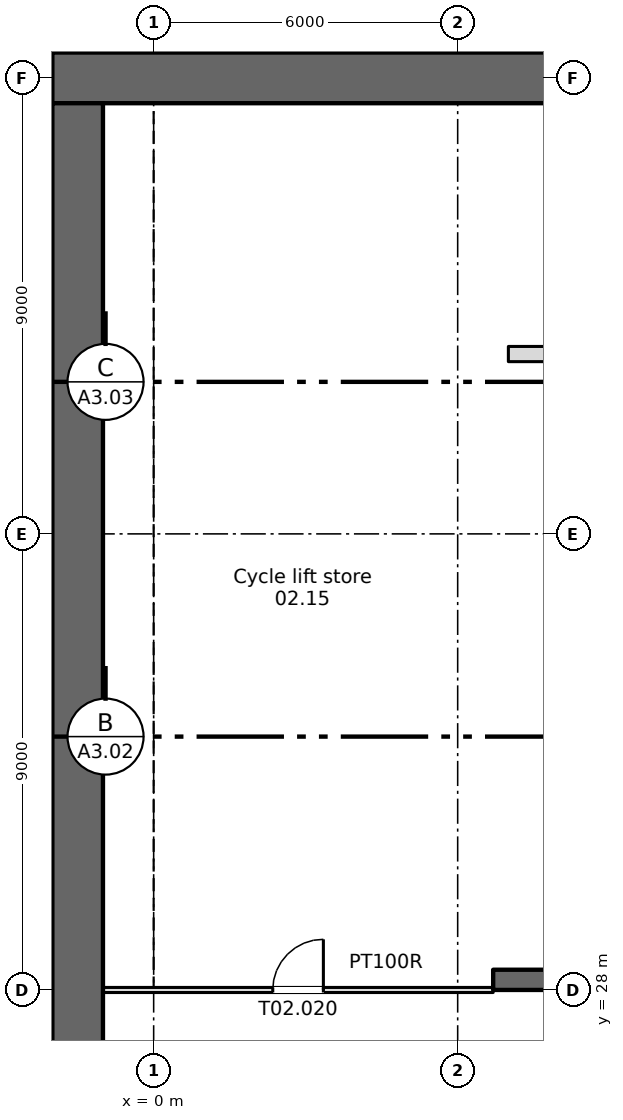
"""IFC4 building model, lengths in metres.
Left out: names, types, materials, properties, quantities, classifications, styles, units other than length and angle.
Written with IfcOpenShell. Run it as: python <this file> out.ifc"""

import sys

from ifc_helpers import new_model, si_unit, direction, frame, frame_2d, origin, place, context, subcontext, project, spatial, rectangle, extrude, element, fill, save


model = new_model("IFC4")
c1 = context("Model", 3, precision=1e-05, world=origin(), true_north=direction((0.0, 1.0)))
c2 = subcontext(c1, "Body", "Model", "MODEL_VIEW")
j1 = project(units=[si_unit("LENGTHUNIT", "METRE"), si_unit("PLANEANGLEUNIT", "RADIAN")], contexts=[c1])
p1 = place(None, origin())
s1 = spatial("IfcSite", under=j1, at=p1, CompositionType="ELEMENT")
p2 = place(p1, origin())
s2 = spatial("IfcBuilding", under=s1, at=p2, CompositionType="ELEMENT")
p3 = place(p2, frame((0.0, 0.0, -6.0)))
s3 = spatial("IfcBuildingStorey", under=s2, at=p3, CompositionType="ELEMENT", Elevation=-6.0)
p4 = place(p3, frame((-2.0, 46.0, 0.0), z_axis=(0.0, 0.0, 1.0), x_axis=(1.0, 0.0, 0.0)))
e1 = element("IfcWall", 1, at=p4, inside=s3, PredefinedType="SOLIDWALL", context=c2, shape_type="SweptSolid", body=[
    extrude(rectangle(XDim=82.0, YDim=1.0, at=frame_2d((41.0, 0.0))), origin(), (0.0, 0.0, 1.0), 5.55),
])
p5 = place(p3, frame((-1.5, -0.5, 0.0), z_axis=(0.0, 0.0, 1.0), x_axis=(0.0, 1.0, 0.0)))
e2 = element("IfcWall", 2, at=p5, inside=s3, PredefinedType="SOLIDWALL", context=c2, shape_type="SweptSolid", body=[
    extrude(rectangle(XDim=46.0, YDim=1.0, at=frame_2d((23.0, 0.0))), origin(), (0.0, 0.0, 1.0), 5.55),
])
p6 = place(p3, frame((6.7, 28.2, 0.0), z_axis=(0.0, 0.0, 1.0), x_axis=(1.0, 0.0, 0.0)))
e3 = element("IfcWall", 3, at=p6, inside=s3, PredefinedType="SHEAR", context=c2, shape_type="SweptSolid", body=[
    extrude(rectangle(XDim=66.3, YDim=0.4, at=frame_2d((33.15, 0.0))), origin(), (0.0, 0.0, 1.0), 5.55),
])
p7 = place(p6, frame((13.85, 0.0, 0.0)))
e4 = element("IfcOpeningElement", 4, at=p7, cuts=e3, PredefinedType="OPENING", context=c2, shape_type="SweptSolid", body=[
    extrude(rectangle(XDim=0.9, YDim=2.1, at=frame_2d((0.45, 1.05))), frame((0.0, 0.21, 0.0), z_axis=(0.0, -1.0, 0.0), x_axis=(1.0, 0.0, 0.0)), (0.0, 0.0, 1.0), 0.42),
])
p8 = place(p6, frame((49.85, 0.0, 0.0)))
e5 = element("IfcOpeningElement", 5, at=p8, cuts=e3, PredefinedType="OPENING", context=c2, shape_type="SweptSolid", body=[
    extrude(rectangle(XDim=0.9, YDim=2.1, at=frame_2d((0.45, 1.05))), frame((0.0, 0.21, 0.0), z_axis=(0.0, -1.0, 0.0), x_axis=(1.0, 0.0, 0.0)), (0.0, 0.0, 1.0), 0.42),
])
p9 = place(p6, frame((1.35, 0.0, 0.0)))
e6 = element("IfcOpeningElement", 6, at=p9, cuts=e3, PredefinedType="OPENING", context=c2, shape_type="SweptSolid", body=[
    extrude(rectangle(XDim=0.9, YDim=2.1, at=frame_2d((0.45, 1.05))), frame((0.0, 0.21, 0.0), z_axis=(0.0, -1.0, 0.0), x_axis=(1.0, 0.0, 0.0)), (0.0, 0.0, 1.0), 0.42),
])
p10 = place(p6, frame((59.363, 0.0, 0.0)))
e7 = element("IfcOpeningElement", 7, at=p10, cuts=e3, PredefinedType="OPENING", context=c2, shape_type="SweptSolid", body=[
    extrude(rectangle(XDim=0.9, YDim=2.1, at=frame_2d((0.45, 1.05))), frame((0.0, 0.21, 0.0), z_axis=(0.0, -1.0, 0.0), x_axis=(1.0, 0.0, 0.0)), (0.0, 0.0, 1.0), 0.42),
])
p11 = place(p6, frame((63.538, 0.0, 0.0)))
e8 = element("IfcOpeningElement", 8, at=p11, cuts=e3, PredefinedType="OPENING", context=c2, shape_type="SweptSolid", body=[
    extrude(rectangle(XDim=0.9, YDim=2.1, at=frame_2d((0.45, 1.05))), frame((0.0, 0.21, 0.0), z_axis=(0.0, -1.0, 0.0), x_axis=(1.0, 0.0, 0.0)), (0.0, 0.0, 1.0), 0.42),
])
p12 = place(p6, frame((4.7, 0.0, 0.0)))
e9 = element("IfcOpeningElement", 9, at=p12, cuts=e3, PredefinedType="OPENING", context=c2, shape_type="SweptSolid", body=[
    extrude(rectangle(XDim=1.2, YDim=2.1, at=frame_2d((0.6, 1.05))), frame((0.0, 0.21, 0.0), z_axis=(0.0, -1.0, 0.0), x_axis=(1.0, 0.0, 0.0)), (0.0, 0.0, 1.0), 0.42),
])
p13 = place(p6, frame((31.7, 0.0, 0.0)))
e10 = element("IfcOpeningElement", 10, at=p13, cuts=e3, PredefinedType="OPENING", context=c2, shape_type="SweptSolid", body=[
    extrude(rectangle(XDim=1.2, YDim=2.1, at=frame_2d((0.6, 1.05))), frame((0.0, 0.21, 0.0), z_axis=(0.0, -1.0, 0.0), x_axis=(1.0, 0.0, 0.0)), (0.0, 0.0, 1.0), 0.42),
])
p14 = place(p6, frame((55.2, 0.0, 0.0)))
e11 = element("IfcOpeningElement", 11, at=p14, cuts=e3, PredefinedType="OPENING", context=c2, shape_type="SweptSolid", body=[
    extrude(rectangle(XDim=1.2, YDim=2.1, at=frame_2d((0.6, 1.05))), frame((0.0, 0.21, 0.0), z_axis=(0.0, -1.0, 0.0), x_axis=(1.0, 0.0, 0.0)), (0.0, 0.0, 1.0), 0.42),
])
p15 = place(p6, frame((21.7, 0.0, 0.0)))
e12 = element("IfcOpeningElement", 12, at=p15, cuts=e3, PredefinedType="OPENING", context=c2, shape_type="SweptSolid", body=[
    extrude(rectangle(XDim=1.2, YDim=2.1, at=frame_2d((0.6, 1.05))), frame((0.0, 0.21, 0.0), z_axis=(0.0, -1.0, 0.0), x_axis=(1.0, 0.0, 0.0)), (0.0, 0.0, 1.0), 0.42),
])
p16 = place(p6, frame((41.7, 0.0, 0.0)))
e13 = element("IfcOpeningElement", 13, at=p16, cuts=e3, PredefinedType="OPENING", context=c2, shape_type="SweptSolid", body=[
    extrude(rectangle(XDim=1.2, YDim=2.1, at=frame_2d((0.6, 1.05))), frame((0.0, 0.21, 0.0), z_axis=(0.0, -1.0, 0.0), x_axis=(1.0, 0.0, 0.0)), (0.0, 0.0, 1.0), 0.42),
])
p17 = place(p6, frame((24.85, 0.0, 0.0)))
e14 = element("IfcOpeningElement", 14, at=p17, cuts=e3, PredefinedType="OPENING", context=c2, shape_type="SweptSolid", body=[
    extrude(rectangle(XDim=2.4, YDim=2.1, at=frame_2d((1.2, 1.05))), frame((0.0, 0.21, 0.0), z_axis=(0.0, -1.0, 0.0), x_axis=(1.0, 0.0, 0.0)), (0.0, 0.0, 1.0), 0.42),
])
p18 = place(p6, frame((37.35, 0.0, 0.0)))
e15 = element("IfcOpeningElement", 15, at=p18, cuts=e3, PredefinedType="OPENING", context=c2, shape_type="SweptSolid", body=[
    extrude(rectangle(XDim=2.4, YDim=2.1, at=frame_2d((1.2, 1.05))), frame((0.0, 0.21, 0.0), z_axis=(0.0, -1.0, 0.0), x_axis=(1.0, 0.0, 0.0)), (0.0, 0.0, 1.0), 0.42),
])
p19 = place(p6, frame((7.8, 0.0, 0.0)))
e16 = element("IfcOpeningElement", 16, at=p19, cuts=e3, PredefinedType="OPENING", context=c2, shape_type="SweptSolid", body=[
    extrude(rectangle(XDim=2.4, YDim=2.1, at=frame_2d((1.2, 1.05))), frame((0.0, 0.21, 0.0), z_axis=(0.0, -1.0, 0.0), x_axis=(1.0, 0.0, 0.0)), (0.0, 0.0, 1.0), 0.42),
])
p20 = place(p6, frame((28.85, 0.0, 0.0)))
e17 = element("IfcOpeningElement", 17, at=p20, cuts=e3, PredefinedType="OPENING", context=c2, shape_type="SweptSolid", body=[
    extrude(rectangle(XDim=0.9, YDim=2.1, at=frame_2d((0.45, 1.05))), frame((0.0, 0.21, 0.0), z_axis=(0.0, -1.0, 0.0), x_axis=(1.0, 0.0, 0.0)), (0.0, 0.0, 1.0), 0.42),
])
p21 = place(p6, frame((34.85, 0.0, 0.0)))
e18 = element("IfcOpeningElement", 18, at=p21, cuts=e3, PredefinedType="OPENING", context=c2, shape_type="SweptSolid", body=[
    extrude(rectangle(XDim=0.9, YDim=2.1, at=frame_2d((0.45, 1.05))), frame((0.0, 0.21, 0.0), z_axis=(0.0, -1.0, 0.0), x_axis=(1.0, 0.0, 0.0)), (0.0, 0.0, 1.0), 0.42),
])
p22 = place(p3, frame((6.85, 28.4, 0.0), z_axis=(0.0, 0.0, 1.0), x_axis=(0.0, 1.0, 0.0)))
e19 = element("IfcWall", 19, at=p22, inside=s3, PredefinedType="SHEAR", context=c2, shape_type="SweptSolid", body=[
    extrude(rectangle(XDim=17.1, YDim=0.3, at=frame_2d((8.55, 0.0))), origin(), (0.0, 0.0, 1.0), 5.55),
])
for number, where, z_axis, x_axis in (
    (20, (7.0, 34.65, 0.0), (0.0, 0.0, 1.0), (1.0, 0.0, 0.0)),
    (21, (7.0, 37.45, 0.0), (0.0, 0.0, 1.0), (1.0, 0.0, 0.0)),
):
    element("IfcWall", number, at=place(p3, frame(where, z_axis=z_axis, x_axis=x_axis)), inside=s3, PredefinedType="SHEAR", context=c2, shape_type="SweptSolid", body=[
        extrude(rectangle(XDim=7.0, YDim=0.3, at=frame_2d((3.5, 0.0))), origin(), (0.0, 0.0, 1.0), 5.55),
    ])
p23 = place(p3, frame((7.0, 40.55, 0.0), z_axis=(0.0, 0.0, 1.0), x_axis=(1.0, 0.0, 0.0)))
e22 = element("IfcWall", 22, at=p23, inside=s3, PredefinedType="PARTITIONING", context=c2, shape_type="SweptSolid", body=[
    extrude(rectangle(XDim=8.9, YDim=0.3, at=frame_2d((4.45, 0.0))), origin(), (0.0, 0.0, 1.0), 5.55),
])
p24 = place(p23, frame((1.712, 0.0, 0.0)))
e23 = element("IfcOpeningElement", 23, at=p24, cuts=e22, PredefinedType="OPENING", context=c2, shape_type="SweptSolid", body=[
    extrude(rectangle(XDim=0.9, YDim=2.1, at=frame_2d((0.45, 1.05))), frame((0.0, 0.16, 0.0), z_axis=(0.0, -1.0, 0.0), x_axis=(1.0, 0.0, 0.0)), (0.0, 0.0, 1.0), 0.32),
])
p25 = place(p23, frame((6.163, 0.0, 0.0)))
e24 = element("IfcOpeningElement", 24, at=p25, cuts=e22, PredefinedType="OPENING", context=c2, shape_type="SweptSolid", body=[
    extrude(rectangle(XDim=0.9, YDim=2.1, at=frame_2d((0.45, 1.05))), frame((0.0, 0.16, 0.0), z_axis=(0.0, -1.0, 0.0), x_axis=(1.0, 0.0, 0.0)), (0.0, 0.0, 1.0), 0.32),
])
p26 = place(p3, frame((-1.0, 28.0, 0.0), z_axis=(0.0, 0.0, 1.0), x_axis=(1.0, 0.0, 0.0)))
e25 = element("IfcWall", 25, at=p26, inside=s3, PredefinedType="PARTITIONING", context=c2, shape_type="SweptSolid", body=[
    extrude(rectangle(XDim=7.7, YDim=0.1, at=frame_2d((3.85, 0.0))), origin(), (0.0, 0.0, 1.0), 5.55),
])
p27 = place(p26, frame((3.35, 0.0, 0.0)))
e26 = element("IfcOpeningElement", 26, at=p27, cuts=e25, PredefinedType="OPENING", context=c2, shape_type="SweptSolid", body=[
    extrude(rectangle(XDim=1.0, YDim=2.1, at=frame_2d((0.5, 1.05))), frame((0.0, 0.06, 0.0), z_axis=(0.0, -1.0, 0.0), x_axis=(1.0, 0.0, 0.0)), (0.0, 0.0, 1.0), 0.12),
])
p28 = place(p27, origin())
e27 = element("IfcDoor", 27, at=p28, inside=s3, OperationType="SINGLE_SWING_RIGHT", PredefinedType="DOOR", context=c2, shape_type="SweptSolid", body=[
    extrude(rectangle(XDim=1.0, YDim=2.1, at=frame_2d((0.5, 1.05))), frame((0.0, 0.025, 0.0), z_axis=(0.0, -1.0, 0.0), x_axis=(1.0, 0.0, 0.0)), (0.0, 0.0, 1.0), 0.05),
])
fill(e26, e27)
save(model, sys.argv[1])
